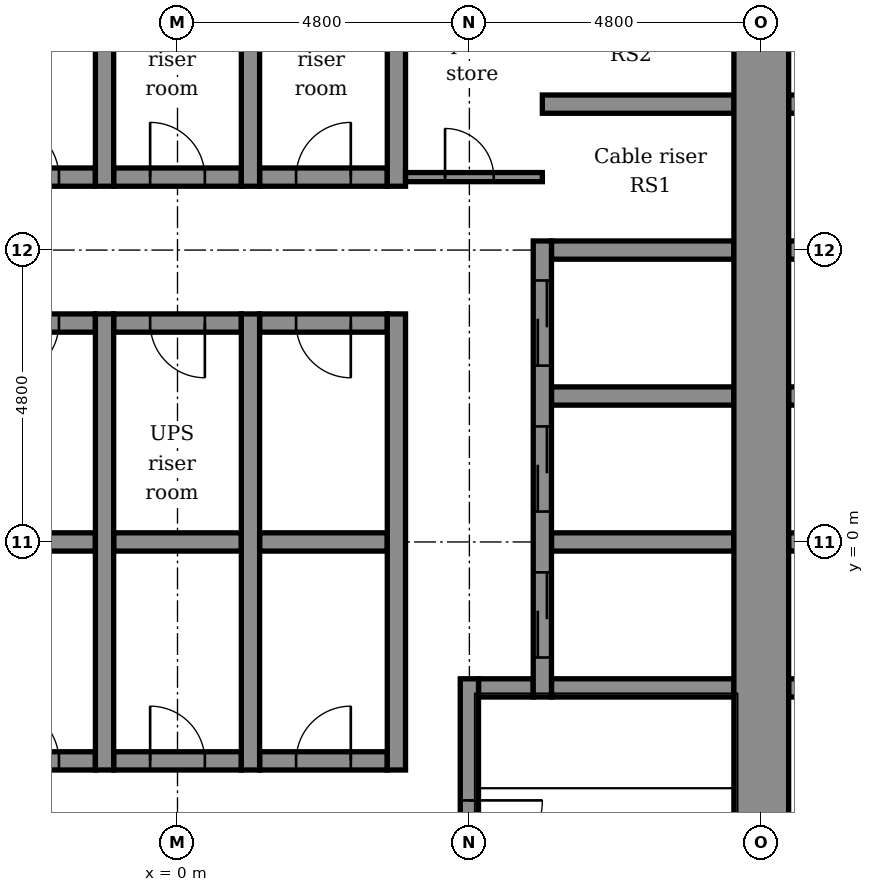
"""IFC4 building model, lengths in metres.
Left out: names, types, materials, properties, quantities, classifications, styles, units other than length and angle.
Written with IfcOpenShell. Run it as: python <this file> out.ifc"""

import sys

from ifc_helpers import new_model, si_unit, direction, frame, frame_2d, origin, place, context, subcontext, project, spatial, rectangle, extrude, element, fill, save


model = new_model("IFC4")
c1 = context("Model", 3, precision=1e-05, world=origin(), true_north=direction((0.0, 1.0)))
c2 = subcontext(c1, "Body", "Model", "MODEL_VIEW")
j1 = project(units=[si_unit("LENGTHUNIT", "METRE"), si_unit("PLANEANGLEUNIT", "RADIAN")], contexts=[c1])
p1 = place(None, origin())
s1 = spatial("IfcSite", under=j1, at=p1, CompositionType="ELEMENT")
p2 = place(p1, origin())
s2 = spatial("IfcBuilding", under=s1, at=p2, CompositionType="ELEMENT")
p3 = place(p2, frame((0.0, 0.0, 113.9)))
s3 = spatial("IfcBuildingStorey", under=s2, at=p3, CompositionType="ELEMENT", Elevation=113.9)
p4 = place(p3, frame((-3.45, -3.6, -0.2), z_axis=(0.0, 0.0, 1.0), x_axis=(1.0, 0.0, 0.0)))
e1 = element("IfcWall", 1, at=p4, inside=s3, PredefinedType="STANDARD", context=c2, shape_type="SweptSolid", body=[
    extrude(rectangle(XDim=2.1, YDim=0.3, at=frame_2d((1.05, 0.0))), origin(), (0.0, 0.0, 1.0), 4.5),
])
p5 = place(p4, frame((0.6, 0.0, 0.2)))
e2 = element("IfcOpeningElement", 2, at=p5, cuts=e1, PredefinedType="OPENING", context=c2, shape_type="SweptSolid", body=[
    extrude(rectangle(XDim=0.9, YDim=2.1, at=frame_2d((0.45, 1.05))), frame((0.0, 0.16, 0.0), z_axis=(0.0, -1.0, 0.0), x_axis=(1.0, 0.0, 0.0)), (0.0, 0.0, 1.0), 0.32),
])
p6 = place(p3, frame((-1.05, -3.6, -0.2), z_axis=(0.0, 0.0, 1.0), x_axis=(1.0, 0.0, 0.0)))
e3 = element("IfcWall", 3, at=p6, inside=s3, PredefinedType="STANDARD", context=c2, shape_type="SweptSolid", body=[
    extrude(rectangle(XDim=2.1, YDim=0.3, at=frame_2d((1.05, 0.0))), origin(), (0.0, 0.0, 1.0), 4.5),
])
p7 = place(p6, frame((0.6, 0.0, 0.2)))
e4 = element("IfcOpeningElement", 4, at=p7, cuts=e3, PredefinedType="OPENING", context=c2, shape_type="SweptSolid", body=[
    extrude(rectangle(XDim=0.9, YDim=2.1, at=frame_2d((0.45, 1.05))), frame((0.0, 0.16, 0.0), z_axis=(0.0, -1.0, 0.0), x_axis=(1.0, 0.0, 0.0)), (0.0, 0.0, 1.0), 0.32),
])
p8 = place(p3, frame((1.35, -3.6, -0.2), z_axis=(0.0, 0.0, 1.0), x_axis=(1.0, 0.0, 0.0)))
e5 = element("IfcWall", 5, at=p8, inside=s3, PredefinedType="STANDARD", context=c2, shape_type="SweptSolid", body=[
    extrude(rectangle(XDim=2.1, YDim=0.3, at=frame_2d((1.05, 0.0))), origin(), (0.0, 0.0, 1.0), 4.5),
])
p9 = place(p8, frame((0.6, 0.0, 0.2)))
e6 = element("IfcOpeningElement", 6, at=p9, cuts=e5, PredefinedType="OPENING", context=c2, shape_type="SweptSolid", body=[
    extrude(rectangle(XDim=0.9, YDim=2.1, at=frame_2d((0.45, 1.05))), frame((0.0, 0.16, 0.0), z_axis=(0.0, -1.0, 0.0), x_axis=(1.0, 0.0, 0.0)), (0.0, 0.0, 1.0), 0.32),
])
p10 = place(p3, frame((4.95, -2.4, -0.2), z_axis=(0.0, 0.0, 1.0), x_axis=(1.0, 0.0, 0.0)))
e7 = element("IfcWall", 7, at=p10, inside=s3, PredefinedType="STANDARD", context=c2, shape_type="SweptSolid", body=[
    extrude(rectangle(XDim=0.9, YDim=0.3, at=frame_2d((0.45, 0.0))), origin(), (0.0, 0.0, 1.0), 4.5),
])
p11 = place(p3, frame((6.15, -2.4, -0.2), z_axis=(0.0, 0.0, 1.0), x_axis=(1.0, 0.0, 0.0)))
e8 = element("IfcWall", 8, at=p11, inside=s3, PredefinedType="STANDARD", context=c2, shape_type="SweptSolid", body=[
    extrude(rectangle(XDim=3.0, YDim=0.3, at=frame_2d((1.5, 0.0))), origin(), (0.0, 0.0, 1.0), 4.5),
])
p12 = place(p3, frame((10.05, -2.4, -0.2), z_axis=(0.0, 0.0, 1.0), x_axis=(1.0, 0.0, 0.0)))
e9 = element("IfcWall", 9, at=p12, inside=s3, PredefinedType="STANDARD", context=c2, shape_type="SweptSolid", body=[
    extrude(rectangle(XDim=3.9, YDim=0.3, at=frame_2d((1.95, 0.0))), origin(), (0.0, 0.0, 1.0), 4.5),
])
p13 = place(p3, frame((-3.45, 0.0, -0.2), z_axis=(0.0, 0.0, 1.0), x_axis=(1.0, 0.0, 0.0)))
e10 = element("IfcWall", 10, at=p13, inside=s3, PredefinedType="STANDARD", context=c2, shape_type="SweptSolid", body=[
    extrude(rectangle(XDim=2.1, YDim=0.3, at=frame_2d((1.05, 0.0))), origin(), (0.0, 0.0, 1.0), 4.5),
])
p14 = place(p3, frame((-1.05, 0.0, -0.2), z_axis=(0.0, 0.0, 1.0), x_axis=(1.0, 0.0, 0.0)))
e11 = element("IfcWall", 11, at=p14, inside=s3, PredefinedType="STANDARD", context=c2, shape_type="SweptSolid", body=[
    extrude(rectangle(XDim=2.1, YDim=0.3, at=frame_2d((1.05, 0.0))), origin(), (0.0, 0.0, 1.0), 4.5),
])
p15 = place(p3, frame((1.35, 0.0, -0.2), z_axis=(0.0, 0.0, 1.0), x_axis=(1.0, 0.0, 0.0)))
e12 = element("IfcWall", 12, at=p15, inside=s3, PredefinedType="STANDARD", context=c2, shape_type="SweptSolid", body=[
    extrude(rectangle(XDim=2.1, YDim=0.3, at=frame_2d((1.05, 0.0))), origin(), (0.0, 0.0, 1.0), 4.5),
])
p16 = place(p3, frame((6.15, 0.0, -0.2), z_axis=(0.0, 0.0, 1.0), x_axis=(1.0, 0.0, 0.0)))
e13 = element("IfcWall", 13, at=p16, inside=s3, PredefinedType="STANDARD", context=c2, shape_type="SweptSolid", body=[
    extrude(rectangle(XDim=3.0, YDim=0.3, at=frame_2d((1.5, 0.0))), origin(), (0.0, 0.0, 1.0), 4.5),
])
p17 = place(p3, frame((10.05, 0.0, -0.2), z_axis=(0.0, 0.0, 1.0), x_axis=(1.0, 0.0, 0.0)))
e14 = element("IfcWall", 14, at=p17, inside=s3, PredefinedType="STANDARD", context=c2, shape_type="SweptSolid", body=[
    extrude(rectangle(XDim=3.9, YDim=0.3, at=frame_2d((1.95, 0.0))), origin(), (0.0, 0.0, 1.0), 4.5),
])
p18 = place(p3, frame((6.15, 2.4, -0.2), z_axis=(0.0, 0.0, 1.0), x_axis=(1.0, 0.0, 0.0)))
e15 = element("IfcWall", 15, at=p18, inside=s3, PredefinedType="STANDARD", context=c2, shape_type="SweptSolid", body=[
    extrude(rectangle(XDim=3.0, YDim=0.3, at=frame_2d((1.5, 0.0))), origin(), (0.0, 0.0, 1.0), 4.5),
])
p19 = place(p3, frame((10.05, 2.4, -0.2), z_axis=(0.0, 0.0, 1.0), x_axis=(1.0, 0.0, 0.0)))
e16 = element("IfcWall", 16, at=p19, inside=s3, PredefinedType="STANDARD", context=c2, shape_type="SweptSolid", body=[
    extrude(rectangle(XDim=3.9, YDim=0.3, at=frame_2d((1.95, 0.0))), origin(), (0.0, 0.0, 1.0), 4.5),
])
p20 = place(p3, frame((-3.45, 3.6, -0.2), z_axis=(0.0, 0.0, 1.0), x_axis=(1.0, 0.0, 0.0)))
e17 = element("IfcWall", 17, at=p20, inside=s3, PredefinedType="STANDARD", context=c2, shape_type="SweptSolid", body=[
    extrude(rectangle(XDim=2.1, YDim=0.3, at=frame_2d((1.05, 0.0))), origin(), (0.0, 0.0, 1.0), 4.5),
])
p21 = place(p20, frame((0.6, 0.0, 0.2)))
e18 = element("IfcOpeningElement", 18, at=p21, cuts=e17, PredefinedType="OPENING", context=c2, shape_type="SweptSolid", body=[
    extrude(rectangle(XDim=0.9, YDim=2.1, at=frame_2d((0.45, 1.05))), frame((0.0, 0.16, 0.0), z_axis=(0.0, -1.0, 0.0), x_axis=(1.0, 0.0, 0.0)), (0.0, 0.0, 1.0), 0.32),
])
p22 = place(p3, frame((-1.05, 3.6, -0.2), z_axis=(0.0, 0.0, 1.0), x_axis=(1.0, 0.0, 0.0)))
e19 = element("IfcWall", 19, at=p22, inside=s3, PredefinedType="STANDARD", context=c2, shape_type="SweptSolid", body=[
    extrude(rectangle(XDim=2.1, YDim=0.3, at=frame_2d((1.05, 0.0))), origin(), (0.0, 0.0, 1.0), 4.5),
])
p23 = place(p22, frame((0.6, 0.0, 0.2)))
e20 = element("IfcOpeningElement", 20, at=p23, cuts=e19, PredefinedType="OPENING", context=c2, shape_type="SweptSolid", body=[
    extrude(rectangle(XDim=0.9, YDim=2.1, at=frame_2d((0.45, 1.05))), frame((0.0, 0.16, 0.0), z_axis=(0.0, -1.0, 0.0), x_axis=(1.0, 0.0, 0.0)), (0.0, 0.0, 1.0), 0.32),
])
p24 = place(p3, frame((1.35, 3.6, -0.2), z_axis=(0.0, 0.0, 1.0), x_axis=(1.0, 0.0, 0.0)))
e21 = element("IfcWall", 21, at=p24, inside=s3, PredefinedType="STANDARD", context=c2, shape_type="SweptSolid", body=[
    extrude(rectangle(XDim=2.1, YDim=0.3, at=frame_2d((1.05, 0.0))), origin(), (0.0, 0.0, 1.0), 4.5),
])
p25 = place(p24, frame((0.6, 0.0, 0.2)))
e22 = element("IfcOpeningElement", 22, at=p25, cuts=e21, PredefinedType="OPENING", context=c2, shape_type="SweptSolid", body=[
    extrude(rectangle(XDim=0.9, YDim=2.1, at=frame_2d((0.45, 1.05))), frame((0.0, 0.16, 0.0), z_axis=(0.0, -1.0, 0.0), x_axis=(1.0, 0.0, 0.0)), (0.0, 0.0, 1.0), 0.32),
])
p26 = place(p3, frame((6.15, 4.8, -0.2), z_axis=(0.0, 0.0, 1.0), x_axis=(1.0, 0.0, 0.0)))
e23 = element("IfcWall", 23, at=p26, inside=s3, PredefinedType="STANDARD", context=c2, shape_type="SweptSolid", body=[
    extrude(rectangle(XDim=3.0, YDim=0.3, at=frame_2d((1.5, 0.0))), origin(), (0.0, 0.0, 1.0), 4.5),
])
p27 = place(p3, frame((10.05, 4.8, -0.2), z_axis=(0.0, 0.0, 1.0), x_axis=(1.0, 0.0, 0.0)))
e24 = element("IfcWall", 24, at=p27, inside=s3, PredefinedType="STANDARD", context=c2, shape_type="SweptSolid", body=[
    extrude(rectangle(XDim=3.9, YDim=0.3, at=frame_2d((1.95, 0.0))), origin(), (0.0, 0.0, 1.0), 4.5),
])
p28 = place(p3, frame((-3.45, 6.0, -0.2), z_axis=(0.0, 0.0, 1.0), x_axis=(1.0, 0.0, 0.0)))
e25 = element("IfcWall", 25, at=p28, inside=s3, PredefinedType="STANDARD", context=c2, shape_type="SweptSolid", body=[
    extrude(rectangle(XDim=2.1, YDim=0.3, at=frame_2d((1.05, 0.0))), origin(), (0.0, 0.0, 1.0), 4.5),
])
p29 = place(p28, frame((0.6, 0.0, 0.2)))
e26 = element("IfcOpeningElement", 26, at=p29, cuts=e25, PredefinedType="OPENING", context=c2, shape_type="SweptSolid", body=[
    extrude(rectangle(XDim=0.9, YDim=2.1, at=frame_2d((0.45, 1.05))), frame((0.0, 0.16, 0.0), z_axis=(0.0, -1.0, 0.0), x_axis=(1.0, 0.0, 0.0)), (0.0, 0.0, 1.0), 0.32),
])
p30 = place(p3, frame((-1.05, 6.0, -0.2), z_axis=(0.0, 0.0, 1.0), x_axis=(1.0, 0.0, 0.0)))
e27 = element("IfcWall", 27, at=p30, inside=s3, PredefinedType="STANDARD", context=c2, shape_type="SweptSolid", body=[
    extrude(rectangle(XDim=2.1, YDim=0.3, at=frame_2d((1.05, 0.0))), origin(), (0.0, 0.0, 1.0), 4.5),
])
p31 = place(p30, frame((0.6, 0.0, 0.2)))
e28 = element("IfcOpeningElement", 28, at=p31, cuts=e27, PredefinedType="OPENING", context=c2, shape_type="SweptSolid", body=[
    extrude(rectangle(XDim=0.9, YDim=2.1, at=frame_2d((0.45, 1.05))), frame((0.0, 0.16, 0.0), z_axis=(0.0, -1.0, 0.0), x_axis=(1.0, 0.0, 0.0)), (0.0, 0.0, 1.0), 0.32),
])
p32 = place(p3, frame((1.35, 6.0, -0.2), z_axis=(0.0, 0.0, 1.0), x_axis=(1.0, 0.0, 0.0)))
e29 = element("IfcWall", 29, at=p32, inside=s3, PredefinedType="STANDARD", context=c2, shape_type="SweptSolid", body=[
    extrude(rectangle(XDim=2.1, YDim=0.3, at=frame_2d((1.05, 0.0))), origin(), (0.0, 0.0, 1.0), 4.5),
])
p33 = place(p32, frame((0.6, 0.0, 0.2)))
e30 = element("IfcOpeningElement", 30, at=p33, cuts=e29, PredefinedType="OPENING", context=c2, shape_type="SweptSolid", body=[
    extrude(rectangle(XDim=0.9, YDim=2.1, at=frame_2d((0.45, 1.05))), frame((0.0, 0.16, 0.0), z_axis=(0.0, -1.0, 0.0), x_axis=(1.0, 0.0, 0.0)), (0.0, 0.0, 1.0), 0.32),
])
p34 = place(p3, frame((6.0, 7.2, -0.2), z_axis=(0.0, 0.0, 1.0), x_axis=(1.0, 0.0, 0.0)))
e31 = element("IfcWall", 31, at=p34, inside=s3, PredefinedType="STANDARD", context=c2, shape_type="SweptSolid", body=[
    extrude(rectangle(XDim=3.15, YDim=0.3, at=frame_2d((1.575, 0.0))), origin(), (0.0, 0.0, 1.0), 4.5),
])
p35 = place(p3, frame((10.05, 7.2, -0.2), z_axis=(0.0, 0.0, 1.0), x_axis=(1.0, 0.0, 0.0)))
e32 = element("IfcWall", 32, at=p35, inside=s3, PredefinedType="STANDARD", context=c2, shape_type="SweptSolid", body=[
    extrude(rectangle(XDim=3.9, YDim=0.3, at=frame_2d((1.95, 0.0))), origin(), (0.0, 0.0, 1.0), 4.5),
])
p36 = place(p3, frame((-1.2, -3.75, -0.2), z_axis=(0.0, 0.0, 1.0), x_axis=(0.0, 1.0, 0.0)))
e33 = element("IfcWall", 33, at=p36, inside=s3, PredefinedType="STANDARD", context=c2, shape_type="SweptSolid", body=[
    extrude(rectangle(XDim=7.5, YDim=0.3, at=frame_2d((3.75, 0.0))), origin(), (0.0, 0.0, 1.0), 4.5),
])
p37 = place(p3, frame((-1.2, 5.85, -0.2), z_axis=(0.0, 0.0, 1.0), x_axis=(0.0, 1.0, 0.0)))
e34 = element("IfcWall", 34, at=p37, inside=s3, PredefinedType="STANDARD", context=c2, shape_type="SweptSolid", body=[
    extrude(rectangle(XDim=3.3, YDim=0.3, at=frame_2d((1.65, 0.0))), origin(), (0.0, 0.0, 1.0), 4.5),
])
p38 = place(p3, frame((1.2, -3.75, -0.2), z_axis=(0.0, 0.0, 1.0), x_axis=(0.0, 1.0, 0.0)))
e35 = element("IfcWall", 35, at=p38, inside=s3, PredefinedType="STANDARD", context=c2, shape_type="SweptSolid", body=[
    extrude(rectangle(XDim=7.5, YDim=0.3, at=frame_2d((3.75, 0.0))), origin(), (0.0, 0.0, 1.0), 4.5),
])
p39 = place(p3, frame((1.2, 5.85, -0.2), z_axis=(0.0, 0.0, 1.0), x_axis=(0.0, 1.0, 0.0)))
e36 = element("IfcWall", 36, at=p39, inside=s3, PredefinedType="STANDARD", context=c2, shape_type="SweptSolid", body=[
    extrude(rectangle(XDim=3.3, YDim=0.3, at=frame_2d((1.65, 0.0))), origin(), (0.0, 0.0, 1.0), 4.5),
])
p40 = place(p3, frame((3.6, -3.75, -0.2), z_axis=(0.0, 0.0, 1.0), x_axis=(0.0, 1.0, 0.0)))
e37 = element("IfcWall", 37, at=p40, inside=s3, PredefinedType="STANDARD", context=c2, shape_type="SweptSolid", body=[
    extrude(rectangle(XDim=7.5, YDim=0.3, at=frame_2d((3.75, 0.0))), origin(), (0.0, 0.0, 1.0), 4.5),
])
p41 = place(p3, frame((3.6, 5.85, -0.2), z_axis=(0.0, 0.0, 1.0), x_axis=(0.0, 1.0, 0.0)))
e38 = element("IfcWall", 38, at=p41, inside=s3, PredefinedType="STANDARD", context=c2, shape_type="SweptSolid", body=[
    extrude(rectangle(XDim=3.3, YDim=0.3, at=frame_2d((1.65, 0.0))), origin(), (0.0, 0.0, 1.0), 4.5),
])
p42 = place(p3, frame((4.8, -9.15, -0.2), z_axis=(0.0, 0.0, 1.0), x_axis=(0.0, 1.0, 0.0)))
e39 = element("IfcWall", 39, at=p42, inside=s3, PredefinedType="STANDARD", context=c2, shape_type="SweptSolid", body=[
    extrude(rectangle(XDim=6.9, YDim=0.3, at=frame_2d((3.45, 0.0))), origin(), (0.0, 0.0, 1.0), 4.5),
])
p43 = place(p42, frame((3.7, 0.0, 0.2)))
e40 = element("IfcOpeningElement", 40, at=p43, cuts=e39, PredefinedType="OPENING", context=c2, shape_type="SweptSolid", body=[
    extrude(rectangle(XDim=1.2, YDim=2.1, at=frame_2d((0.6, 1.05))), frame((0.0, 0.16, 0.0), z_axis=(0.0, -1.0, 0.0), x_axis=(1.0, 0.0, 0.0)), (0.0, 0.0, 1.0), 0.32),
])
p44 = place(p3, frame((6.0, -2.55, -0.2), z_axis=(0.0, 0.0, 1.0), x_axis=(0.0, 1.0, 0.0)))
e41 = element("IfcWall", 41, at=p44, inside=s3, PredefinedType="STANDARD", context=c2, shape_type="SweptSolid", body=[
    extrude(rectangle(XDim=7.5, YDim=0.3, at=frame_2d((3.75, 0.0))), origin(), (0.0, 0.0, 1.0), 4.5),
])
p45 = place(p44, frame((0.65, 0.0, 0.2)))
e42 = element("IfcOpeningElement", 42, at=p45, cuts=e41, PredefinedType="OPENING", context=c2, shape_type="SweptSolid", body=[
    extrude(rectangle(XDim=1.4, YDim=2.1, at=frame_2d((0.7, 1.05))), frame((0.0, 0.16, 0.0), z_axis=(0.0, -1.0, 0.0), x_axis=(1.0, 0.0, 0.0)), (0.0, 0.0, 1.0), 0.32),
])
p46 = place(p44, frame((3.05, 0.0, 0.2)))
e43 = element("IfcOpeningElement", 43, at=p46, cuts=e41, PredefinedType="OPENING", context=c2, shape_type="SweptSolid", body=[
    extrude(rectangle(XDim=1.4, YDim=2.1, at=frame_2d((0.7, 1.05))), frame((0.0, 0.16, 0.0), z_axis=(0.0, -1.0, 0.0), x_axis=(1.0, 0.0, 0.0)), (0.0, 0.0, 1.0), 0.32),
])
p47 = place(p44, frame((5.45, 0.0, 0.2)))
e44 = element("IfcOpeningElement", 44, at=p47, cuts=e41, PredefinedType="OPENING", context=c2, shape_type="SweptSolid", body=[
    extrude(rectangle(XDim=1.4, YDim=2.1, at=frame_2d((0.7, 1.05))), frame((0.0, 0.16, 0.0), z_axis=(0.0, -1.0, 0.0), x_axis=(1.0, 0.0, 0.0)), (0.0, 0.0, 1.0), 0.32),
])
p48 = place(p3, frame((9.6, -10.15, -0.2), z_axis=(0.0, 0.0, 1.0), x_axis=(0.0, 1.0, 0.0)))
e45 = element("IfcWall", 45, at=p48, inside=s3, PredefinedType="SHEAR", context=c2, shape_type="SweptSolid", body=[
    extrude(rectangle(XDim=20.2, YDim=0.9, at=frame_2d((10.1, 0.0))), origin(), (0.0, 0.0, 1.0), 4.5),
])
p49 = place(p3, frame((3.75, 6.0, 0.0), z_axis=(0.0, 0.0, 1.0), x_axis=(1.0, 0.0, 0.0)))
e46 = element("IfcWall", 46, at=p49, inside=s3, PredefinedType="PARTITIONING", context=c2, shape_type="SweptSolid", body=[
    extrude(rectangle(XDim=2.25, YDim=0.15, at=frame_2d((1.125, 0.0))), origin(), (0.0, 0.0, 1.0), 4.3),
])
p50 = place(p49, frame((0.65, 0.0, 0.0)))
e47 = element("IfcOpeningElement", 47, at=p50, cuts=e46, PredefinedType="OPENING", context=c2, shape_type="SweptSolid", body=[
    extrude(rectangle(XDim=0.8, YDim=2.1, at=frame_2d((0.4, 1.05))), frame((0.0, 0.085, 0.0), z_axis=(0.0, -1.0, 0.0), x_axis=(1.0, 0.0, 0.0)), (0.0, 0.0, 1.0), 0.17),
])
p51 = place(p50, origin())
e48 = element("IfcDoor", 48, at=p51, inside=s3, OperationType="SINGLE_SWING_LEFT", PredefinedType="DOOR", context=c2, shape_type="SweptSolid", body=[
    extrude(rectangle(XDim=0.8, YDim=2.1, at=frame_2d((0.4, 1.05))), frame((0.0, 0.025, 0.0), z_axis=(0.0, -1.0, 0.0), x_axis=(1.0, 0.0, 0.0)), (0.0, 0.0, 1.0), 0.05),
])
fill(e47, e48)
p52 = place(p45, origin())
e49 = element("IfcDoor", 49, at=p52, inside=s3, OperationType="DOUBLE_DOOR_SLIDING", PredefinedType="DOOR", context=c2, shape_type="SweptSolid", body=[
    extrude(rectangle(XDim=1.4, YDim=2.1, at=frame_2d((0.7, 1.05))), frame((0.0, 0.025, 0.0), z_axis=(0.0, -1.0, 0.0), x_axis=(1.0, 0.0, 0.0)), (0.0, 0.0, 1.0), 0.05),
])
fill(e42, e49)
p53 = place(p46, origin())
e50 = element("IfcDoor", 50, at=p53, inside=s3, OperationType="DOUBLE_DOOR_SLIDING", PredefinedType="DOOR", context=c2, shape_type="SweptSolid", body=[
    extrude(rectangle(XDim=1.4, YDim=2.1, at=frame_2d((0.7, 1.05))), frame((0.0, 0.025, 0.0), z_axis=(0.0, -1.0, 0.0), x_axis=(1.0, 0.0, 0.0)), (0.0, 0.0, 1.0), 0.05),
])
fill(e43, e50)
p54 = place(p47, origin())
e51 = element("IfcDoor", 51, at=p54, inside=s3, OperationType="DOUBLE_DOOR_SLIDING", PredefinedType="DOOR", context=c2, shape_type="SweptSolid", body=[
    extrude(rectangle(XDim=1.4, YDim=2.1, at=frame_2d((0.7, 1.05))), frame((0.0, 0.025, 0.0), z_axis=(0.0, -1.0, 0.0), x_axis=(1.0, 0.0, 0.0)), (0.0, 0.0, 1.0), 0.05),
])
fill(e44, e51)
p55 = place(p43, frame((1.2, 0.0, 0.0), z_axis=(0.0, 0.0, 1.0), x_axis=(-1.0, 0.0, 0.0)))
e52 = element("IfcDoor", 52, at=p55, inside=s3, OperationType="SINGLE_SWING_RIGHT", PredefinedType="DOOR", context=c2, shape_type="SweptSolid", body=[
    extrude(rectangle(XDim=1.2, YDim=2.1, at=frame_2d((0.6, 1.05))), frame((0.0, 0.025, 0.0), z_axis=(0.0, -1.0, 0.0), x_axis=(1.0, 0.0, 0.0)), (0.0, 0.0, 1.0), 0.05),
])
fill(e40, e52)
p56 = place(p29, origin())
e53 = element("IfcDoor", 53, at=p56, inside=s3, OperationType="SINGLE_SWING_LEFT", PredefinedType="DOOR", context=c2, shape_type="SweptSolid", body=[
    extrude(rectangle(XDim=0.9, YDim=2.1, at=frame_2d((0.45, 1.05))), frame((0.0, 0.025, 0.0), z_axis=(0.0, -1.0, 0.0), x_axis=(1.0, 0.0, 0.0)), (0.0, 0.0, 1.0), 0.05),
])
fill(e26, e53)
p57 = place(p31, origin())
e54 = element("IfcDoor", 54, at=p57, inside=s3, OperationType="SINGLE_SWING_LEFT", PredefinedType="DOOR", context=c2, shape_type="SweptSolid", body=[
    extrude(rectangle(XDim=0.9, YDim=2.1, at=frame_2d((0.45, 1.05))), frame((0.0, 0.025, 0.0), z_axis=(0.0, -1.0, 0.0), x_axis=(1.0, 0.0, 0.0)), (0.0, 0.0, 1.0), 0.05),
])
fill(e28, e54)
p58 = place(p33, origin())
e55 = element("IfcDoor", 55, at=p58, inside=s3, OperationType="SINGLE_SWING_RIGHT", PredefinedType="DOOR", context=c2, shape_type="SweptSolid", body=[
    extrude(rectangle(XDim=0.9, YDim=2.1, at=frame_2d((0.45, 1.05))), frame((0.0, 0.025, 0.0), z_axis=(0.0, -1.0, 0.0), x_axis=(1.0, 0.0, 0.0)), (0.0, 0.0, 1.0), 0.05),
])
fill(e30, e55)
p59 = place(p21, frame((0.9, 0.0, 0.0), z_axis=(0.0, 0.0, 1.0), x_axis=(-1.0, 0.0, 0.0)))
e56 = element("IfcDoor", 56, at=p59, inside=s3, OperationType="SINGLE_SWING_LEFT", PredefinedType="DOOR", context=c2, shape_type="SweptSolid", body=[
    extrude(rectangle(XDim=0.9, YDim=2.1, at=frame_2d((0.45, 1.05))), frame((0.0, 0.025, 0.0), z_axis=(0.0, -1.0, 0.0), x_axis=(1.0, 0.0, 0.0)), (0.0, 0.0, 1.0), 0.05),
])
fill(e18, e56)
p60 = place(p23, frame((0.9, 0.0, 0.0), z_axis=(0.0, 0.0, 1.0), x_axis=(-1.0, 0.0, 0.0)))
e57 = element("IfcDoor", 57, at=p60, inside=s3, OperationType="SINGLE_SWING_RIGHT", PredefinedType="DOOR", context=c2, shape_type="SweptSolid", body=[
    extrude(rectangle(XDim=0.9, YDim=2.1, at=frame_2d((0.45, 1.05))), frame((0.0, 0.025, 0.0), z_axis=(0.0, -1.0, 0.0), x_axis=(1.0, 0.0, 0.0)), (0.0, 0.0, 1.0), 0.05),
])
fill(e20, e57)
p61 = place(p25, frame((0.9, 0.0, 0.0), z_axis=(0.0, 0.0, 1.0), x_axis=(-1.0, 0.0, 0.0)))
e58 = element("IfcDoor", 58, at=p61, inside=s3, OperationType="SINGLE_SWING_RIGHT", PredefinedType="DOOR", context=c2, shape_type="SweptSolid", body=[
    extrude(rectangle(XDim=0.9, YDim=2.1, at=frame_2d((0.45, 1.05))), frame((0.0, 0.025, 0.0), z_axis=(0.0, -1.0, 0.0), x_axis=(1.0, 0.0, 0.0)), (0.0, 0.0, 1.0), 0.05),
])
fill(e22, e58)
p62 = place(p5, origin())
e59 = element("IfcDoor", 59, at=p62, inside=s3, OperationType="SINGLE_SWING_LEFT", PredefinedType="DOOR", context=c2, shape_type="SweptSolid", body=[
    extrude(rectangle(XDim=0.9, YDim=2.1, at=frame_2d((0.45, 1.05))), frame((0.0, 0.025, 0.0), z_axis=(0.0, -1.0, 0.0), x_axis=(1.0, 0.0, 0.0)), (0.0, 0.0, 1.0), 0.05),
])
fill(e2, e59)
p63 = place(p7, origin())
e60 = element("IfcDoor", 60, at=p63, inside=s3, OperationType="SINGLE_SWING_LEFT", PredefinedType="DOOR", context=c2, shape_type="SweptSolid", body=[
    extrude(rectangle(XDim=0.9, YDim=2.1, at=frame_2d((0.45, 1.05))), frame((0.0, 0.025, 0.0), z_axis=(0.0, -1.0, 0.0), x_axis=(1.0, 0.0, 0.0)), (0.0, 0.0, 1.0), 0.05),
])
fill(e4, e60)
p64 = place(p9, origin())
e61 = element("IfcDoor", 61, at=p64, inside=s3, OperationType="SINGLE_SWING_RIGHT", PredefinedType="DOOR", context=c2, shape_type="SweptSolid", body=[
    extrude(rectangle(XDim=0.9, YDim=2.1, at=frame_2d((0.45, 1.05))), frame((0.0, 0.025, 0.0), z_axis=(0.0, -1.0, 0.0), x_axis=(1.0, 0.0, 0.0)), (0.0, 0.0, 1.0), 0.05),
])
fill(e6, e61)
save(model, sys.argv[1])
